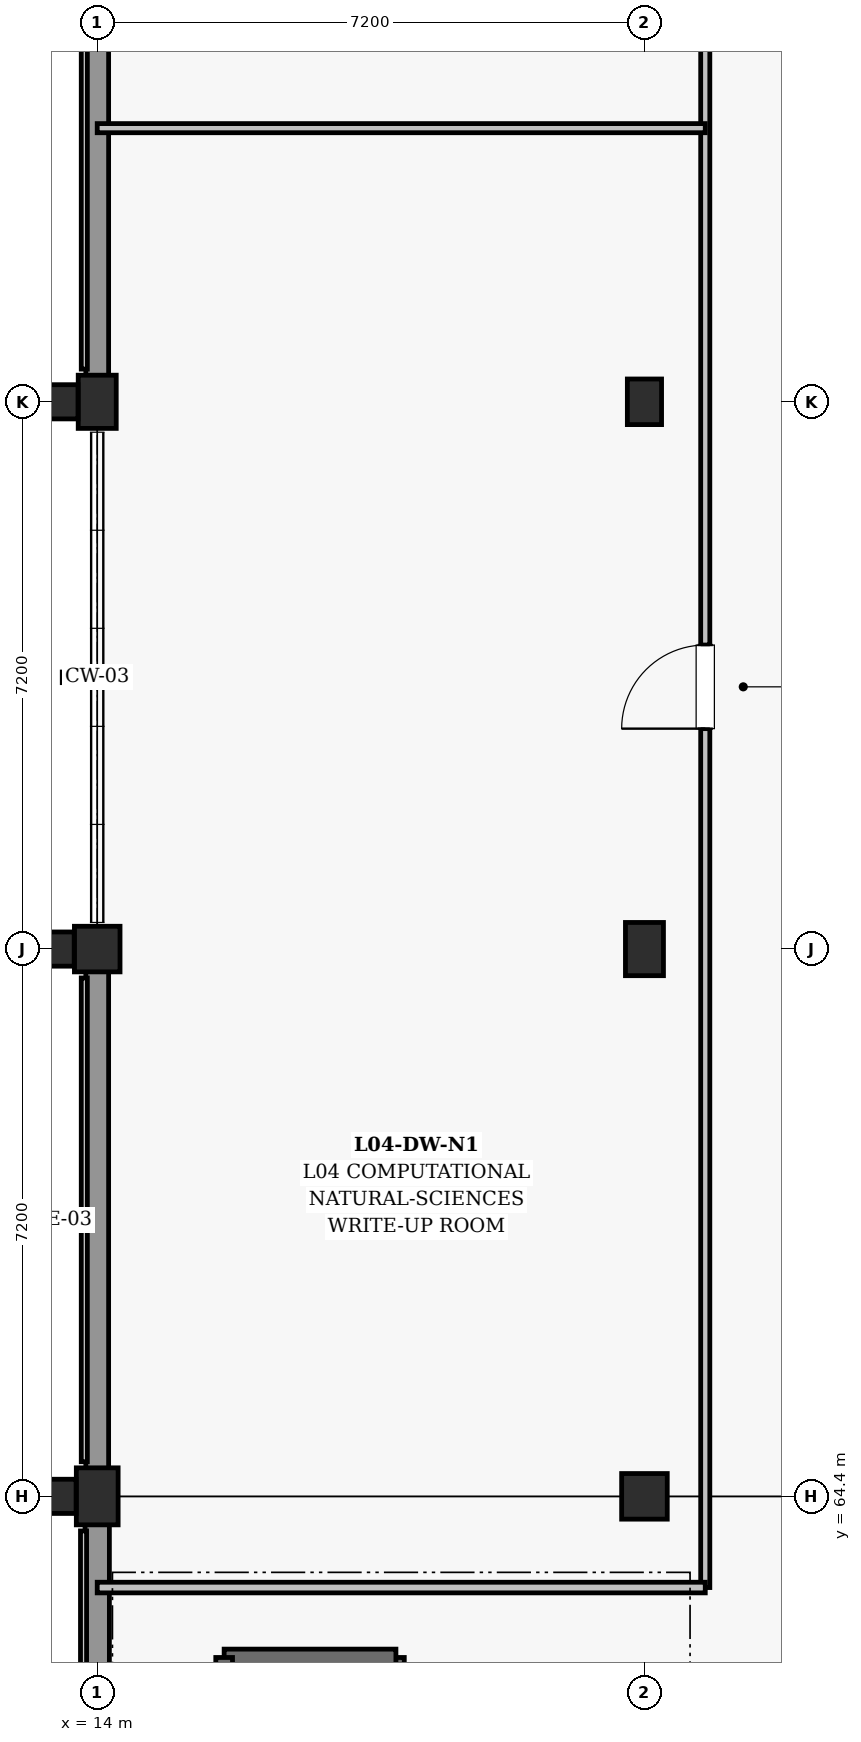
"""IFC4 building model, lengths in metres.
Left out: names, types, materials, properties, quantities, classifications, styles, units other than length and angle.
Written with IfcOpenShell. Run it as: python <this file> out.ifc"""

import sys

from ifc_helpers import new_model, si_unit, direction, frame, frame_2d, origin, origin_2d, place, context, subcontext, project, spatial, rectangle, extrude, element, fill, save


model = new_model("IFC4")
c1 = context("Model", 3, precision=1e-05, world=origin(), true_north=direction((0.0, 1.0)))
c2 = subcontext(c1, "Body", "Model", "MODEL_VIEW")
j1 = project(units=[si_unit("LENGTHUNIT", "METRE"), si_unit("PLANEANGLEUNIT", "RADIAN")], contexts=[c1])
p1 = place(None, origin())
s1 = spatial("IfcSite", under=j1, at=p1, CompositionType="ELEMENT")
p2 = place(p1, origin())
s2 = spatial("IfcBuilding", under=s1, at=p2, CompositionType="ELEMENT")
p3 = place(p2, frame((0.0, 0.0, 18.9)))
s3 = spatial("IfcBuildingStorey", under=s2, at=p3, CompositionType="ELEMENT", Elevation=18.9)
p4 = place(p3, frame((14.0, 64.4, 0.0), z_axis=(0.0, 0.0, 1.0), x_axis=(1.0, 0.0, 0.0)))
e1 = element("IfcColumn", 1, at=p4, inside=s3, PredefinedType="COLUMN", context=c2, shape_type="SweptSolid", body=[
    extrude(rectangle(XDim=0.55, YDim=0.75, at=origin_2d()), origin(), (0.0, 0.0, 1.0), 4.5),
])
p5 = place(p3, frame((14.0, 71.6, 0.0), z_axis=(0.0, 0.0, 1.0), x_axis=(1.0, 0.0, 0.0)))
e2 = element("IfcColumn", 2, at=p5, inside=s3, PredefinedType="COLUMN", context=c2, shape_type="SweptSolid", body=[
    extrude(rectangle(XDim=0.6, YDim=0.6, at=origin_2d()), origin(), (0.0, 0.0, 1.0), 4.5),
])
p6 = place(p3, frame((14.0, 78.8, 0.0), z_axis=(0.0, 0.0, 1.0), x_axis=(1.0, 0.0, 0.0)))
e3 = element("IfcColumn", 3, at=p6, inside=s3, PredefinedType="COLUMN", context=c2, shape_type="SweptSolid", body=[
    extrude(rectangle(XDim=0.5, YDim=0.7, at=origin_2d()), origin(), (0.0, 0.0, 1.0), 4.5),
])
p7 = place(p3, frame((21.2, 64.4, 0.0), z_axis=(0.0, 0.0, 1.0), x_axis=(1.0, 0.0, 0.0)))
e4 = element("IfcColumn", 4, at=p7, inside=s3, PredefinedType="COLUMN", context=c2, shape_type="SweptSolid", body=[
    extrude(rectangle(XDim=0.6, YDim=0.6, at=origin_2d()), origin(), (0.0, 0.0, 1.0), 4.5),
])
p8 = place(p3, frame((21.2, 71.6, 0.0), z_axis=(0.0, 0.0, 1.0), x_axis=(1.0, 0.0, 0.0)))
e5 = element("IfcColumn", 5, at=p8, inside=s3, PredefinedType="COLUMN", context=c2, shape_type="SweptSolid", body=[
    extrude(rectangle(XDim=0.5, YDim=0.7, at=origin_2d()), origin(), (0.0, 0.0, 1.0), 4.5),
])
p9 = place(p3, frame((21.2, 78.8, 0.0), z_axis=(0.0, 0.0, 1.0), x_axis=(1.0, 0.0, 0.0)))
e6 = element("IfcColumn", 6, at=p9, inside=s3, PredefinedType="COLUMN", context=c2, shape_type="SweptSolid", body=[
    extrude(rectangle(XDim=0.45, YDim=0.6, at=origin_2d()), origin(), (0.0, 0.0, 1.0), 4.5),
])
for number, where, z_axis, x_axis in (
    (7, (13.397, 64.4, 0.0), (0.0, 0.0, 1.0), (0.0, 1.0, 0.0)),
    (8, (13.372, 71.6, 0.0), (0.0, 0.0, 1.0), (0.0, 1.0, 0.0)),
    (9, (13.422, 78.8, 0.0), (0.0, 0.0, 1.0), (0.0, 1.0, 0.0)),
):
    element("IfcColumn", number, at=place(p3, frame(where, z_axis=z_axis, x_axis=x_axis)), inside=s3, PredefinedType="PILASTER", context=c2, shape_type="SweptSolid", body=[
        extrude(rectangle(XDim=0.45, YDim=0.65, at=origin_2d()), origin(), (0.0, 0.0, 1.0), 4.5),
    ])
p10 = place(p3, frame((14.0, 57.455, 0.0), z_axis=(0.0, 0.0, 1.0), x_axis=(0.0, 1.0, 0.0)))
e10 = element("IfcWall", 10, at=p10, inside=s3, PredefinedType="SOLIDWALL", context=c2, shape_type="SweptSolid", body=[
    extrude(rectangle(XDim=6.59, YDim=0.32, at=frame_2d((3.295, 0.0))), origin(), (0.0, 0.0, 1.0), 3.455),
])
p11 = place(p3, frame((14.0, 64.755, 0.0), z_axis=(0.0, 0.0, 1.0), x_axis=(0.0, 1.0, 0.0)))
e11 = element("IfcWall", 11, at=p11, inside=s3, PredefinedType="SOLIDWALL", context=c2, shape_type="SweptSolid", body=[
    extrude(rectangle(XDim=6.565, YDim=0.3, at=frame_2d((3.283, 0.0))), origin(), (0.0, 0.0, 1.0), 3.425),
])
p12 = place(p3, frame((14.0, 79.13, 0.0), z_axis=(0.0, 0.0, 1.0), x_axis=(0.0, 1.0, 0.0)))
e12 = element("IfcWall", 12, at=p12, inside=s3, PredefinedType="SOLIDWALL", context=c2, shape_type="SweptSolid", body=[
    extrude(rectangle(XDim=6.59, YDim=0.3, at=frame_2d((3.295, 0.0))), origin(), (0.0, 0.0, 1.0), 3.375),
])
p13 = place(p3, frame((17.93, 59.72, 0.0), z_axis=(0.0, 0.0, 1.0), x_axis=(0.0, 1.0, 0.0)))
e13 = element("IfcWall", 13, at=p13, inside=s3, PredefinedType="SHEAR", context=c2, shape_type="SweptSolid", body=[
    extrude(rectangle(XDim=2.56, YDim=0.22, at=frame_2d((1.28, 0.0))), origin(), (0.0, 0.0, 1.0), 4.195),
])
p14 = place(p13, frame((0.73, 0.0, 0.0)))
e14 = element("IfcOpeningElement", 14, at=p14, cuts=e13, PredefinedType="OPENING", context=c2, shape_type="SweptSolid", body=[
    extrude(rectangle(XDim=1.1, YDim=2.15, at=frame_2d((0.55, 1.075))), frame((0.0, 0.12, 0.0), z_axis=(0.0, -1.0, 0.0), x_axis=(1.0, 0.0, 0.0)), (0.0, 0.0, 1.0), 0.24),
])
p15 = place(p3, frame((17.93, 62.28, 0.0), z_axis=(0.0, 0.0, 1.0), x_axis=(-1.0, 0.0, 0.0)))
e15 = element("IfcWall", 15, at=p15, inside=s3, PredefinedType="SHEAR", context=c2, shape_type="SweptSolid", body=[
    extrude(rectangle(XDim=2.26, YDim=0.22, at=frame_2d((1.13, 0.0))), origin(), (0.0, 0.0, 1.0), 4.195),
])
p16 = place(p3, frame((15.67, 62.28, 0.0), z_axis=(0.0, 0.0, 1.0), x_axis=(0.0, -1.0, 0.0)))
e16 = element("IfcWall", 16, at=p16, inside=s3, PredefinedType="SHEAR", context=c2, shape_type="SweptSolid", body=[
    extrude(rectangle(XDim=2.56, YDim=0.22, at=frame_2d((1.28, 0.0))), origin(), (0.0, 0.0, 1.0), 4.195),
])
p17 = place(p3, frame((22.0, 63.2, 0.0), z_axis=(0.0, 0.0, 1.0), x_axis=(0.0, 1.0, 0.0)))
e17 = element("IfcWall", 17, at=p17, inside=s3, PredefinedType="PARTITIONING", context=c2, shape_type="SweptSolid", body=[
    extrude(rectangle(XDim=39.6, YDim=0.12, at=frame_2d((19.8, 0.0))), origin(), (0.0, 0.0, 1.0), 3.38),
])
p18 = place(p17, frame((11.3, 0.0, 0.0)))
e18 = element("IfcOpeningElement", 18, at=p18, cuts=e17, PredefinedType="OPENING", context=c2, shape_type="SweptSolid", body=[
    extrude(rectangle(XDim=1.1, YDim=2.15, at=frame_2d((0.55, 1.075))), frame((0.0, 0.07, 0.0), z_axis=(0.0, -1.0, 0.0), x_axis=(1.0, 0.0, 0.0)), (0.0, 0.0, 1.0), 0.14),
])
p19 = place(p17, frame((26.3, 0.0, 0.0)))
e19 = element("IfcOpeningElement", 19, at=p19, cuts=e17, PredefinedType="OPENING", context=c2, shape_type="SweptSolid", body=[
    extrude(rectangle(XDim=1.18, YDim=2.2, at=frame_2d((0.59, 1.1))), frame((0.0, 0.07, 0.0), z_axis=(0.0, -1.0, 0.0), x_axis=(1.0, 0.0, 0.0)), (0.0, 0.0, 1.0), 0.14),
])
p20 = place(p3, frame((14.0, 63.2, 0.0), z_axis=(0.0, 0.0, 1.0), x_axis=(1.0, 0.0, 0.0)))
e20 = element("IfcWall", 20, at=p20, inside=s3, PredefinedType="PARTITIONING", context=c2, shape_type="SweptSolid", body=[
    extrude(rectangle(XDim=8.0, YDim=0.14, at=frame_2d((4.0, 0.0))), origin(), (0.0, 0.0, 1.0), 3.58),
])
p21 = place(p3, frame((14.0, 82.4, 0.0), z_axis=(0.0, 0.0, 1.0), x_axis=(1.0, 0.0, 0.0)))
e21 = element("IfcWall", 21, at=p21, inside=s3, PredefinedType="PARTITIONING", context=c2, shape_type="SweptSolid", body=[
    extrude(rectangle(XDim=8.0, YDim=0.12, at=frame_2d((4.0, 0.0))), origin(), (0.0, 0.0, 1.0), 3.58),
])
p22 = place(p18, origin())
e22 = element("IfcDoor", 22, at=p22, inside=s3, OperationType="SINGLE_SWING_LEFT", PredefinedType="DOOR", context=c2, shape_type="SweptSolid", body=[
    extrude(rectangle(XDim=1.1, YDim=2.15, at=frame_2d((0.55, 1.075))), frame((0.0, 0.025, 0.0), z_axis=(0.0, -1.0, 0.0), x_axis=(1.0, 0.0, 0.0)), (0.0, 0.0, 1.0), 0.05),
])
fill(e18, e22)
save(model, sys.argv[1])
